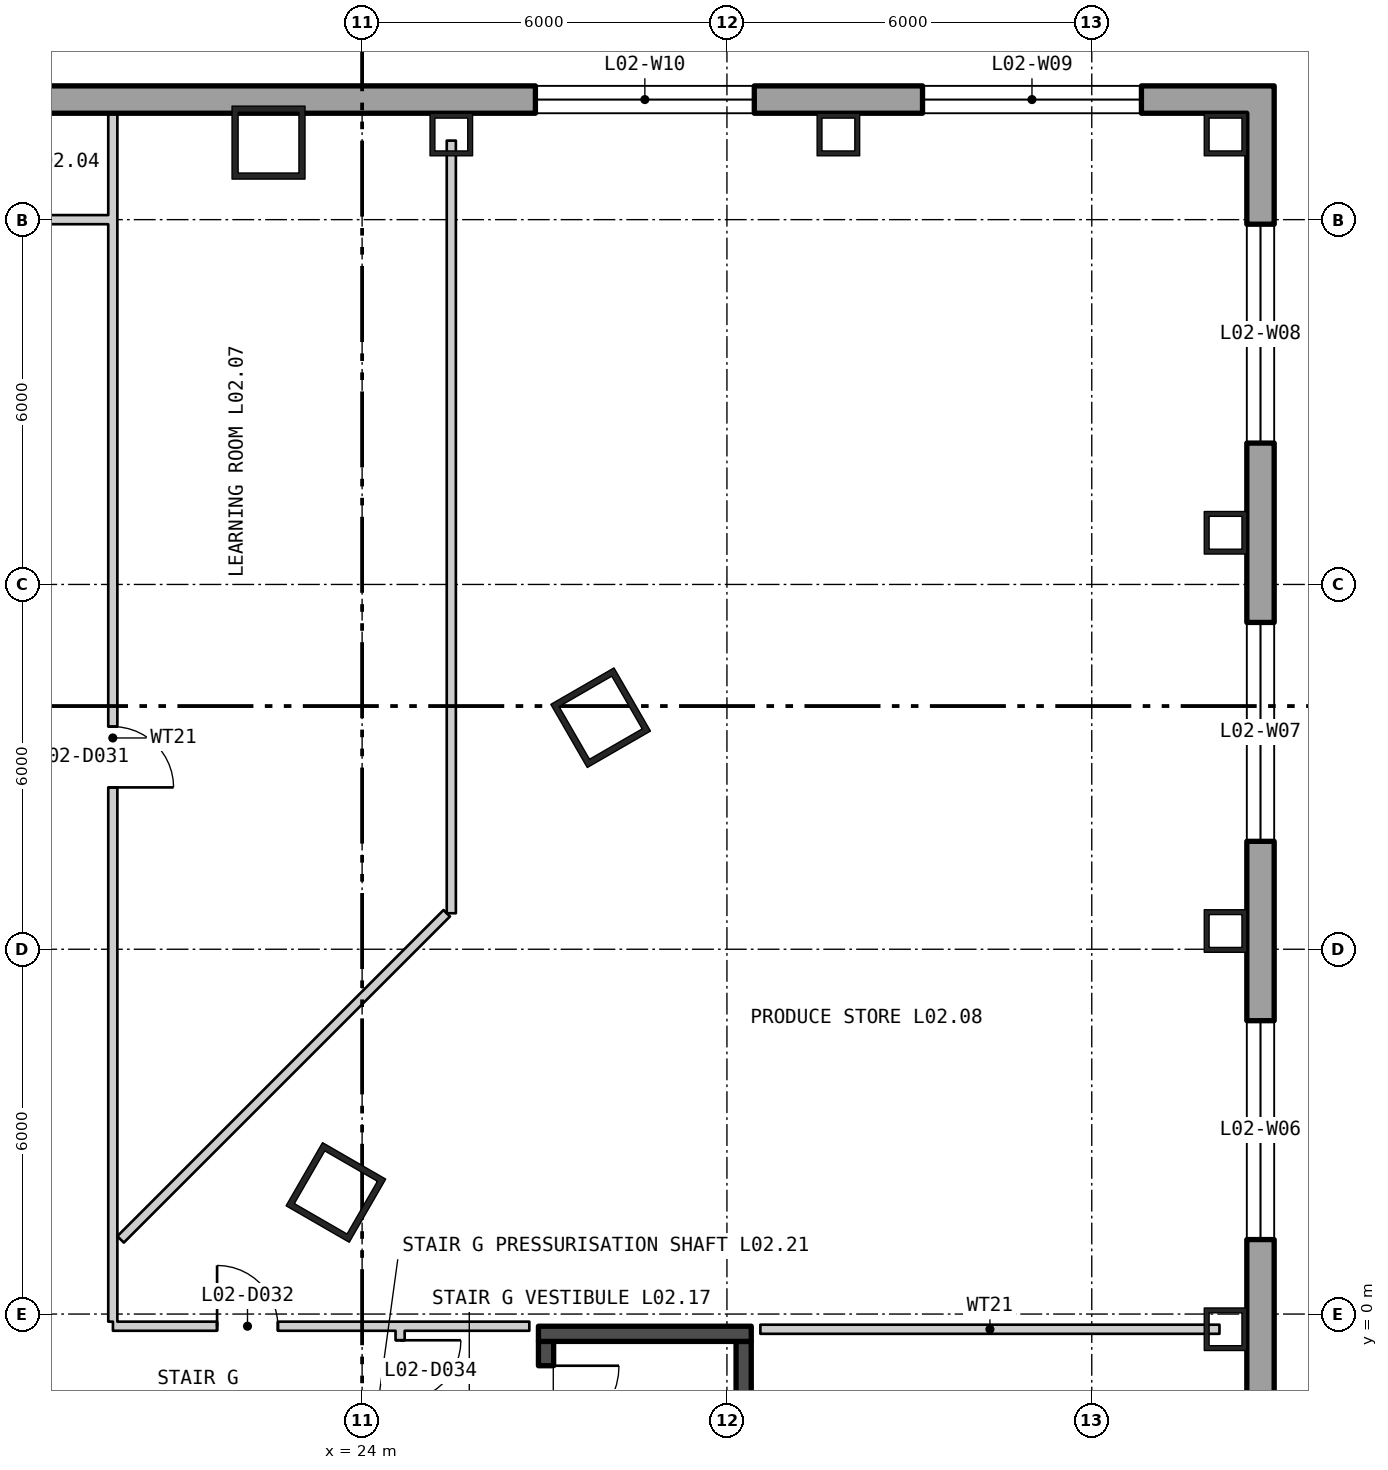
"""IFC4 building model, lengths in metres.
Left out: names, types, materials, properties, quantities, classifications, styles, units other than length and angle.
Written with IfcOpenShell. Run it as: python <this file> out.ifc"""

import sys

from ifc_helpers import new_model, si_unit, direction, frame, frame_2d, origin, origin_2d, place, context, subcontext, project, spatial, polyline, rectangle, hollow_rectangle, outline, extrude, element, fill, save


model = new_model("IFC4")
c1 = context("Model", 3, precision=1e-05, world=origin(), true_north=direction((0.0, 1.0)))
c2 = subcontext(c1, "Body", "Model", "MODEL_VIEW")
j1 = project(units=[si_unit("LENGTHUNIT", "METRE"), si_unit("PLANEANGLEUNIT", "RADIAN")], contexts=[c1])
p1 = place(None, origin())
s1 = spatial("IfcSite", under=j1, at=p1, CompositionType="ELEMENT")
p2 = place(p1, origin())
s2 = spatial("IfcBuilding", under=s1, at=p2, CompositionType="ELEMENT")
p3 = place(p2, frame((0.0, 0.0, 13.5)))
s3 = spatial("IfcBuildingStorey", under=s2, at=p3, CompositionType="ELEMENT", Elevation=13.5)
for number, where, z_axis, x_axis in (
    (1, (22.461, 19.267, 0.0), (0.0, 0.0, 1.0), (-1.0, 0.0, 0.0)),
    (2, (23.569, 2.0, 0.0), (0.0, 0.0, 1.0), (0.5, 0.866, 0.0)),
    (3, (27.923, 9.808, 0.0), (0.0, 0.0, 1.0), (-0.5, 0.866, 0.0)),
):
    element("IfcColumn", number, at=place(p3, frame(where, z_axis=z_axis, x_axis=x_axis)), inside=s3, PredefinedType="COLUMN", context=c2, shape_type="SweptSolid", body=[
        extrude(hollow_rectangle(XDim=1.2, YDim=1.2, WallThickness=0.1, at=origin_2d()), origin(), (0.0, 0.0, 1.0), 5.1),
    ])
for number, where, z_axis, x_axis in (
    (4, (38.2, -0.25, 0.0), (0.0, 0.0, 1.0), (0.0, 1.0, 0.0)),
    (5, (38.2, 6.3, 0.0), (0.0, 0.0, 1.0), (0.0, 1.0, 0.0)),
    (6, (38.2, 12.85, 0.0), (0.0, 0.0, 1.0), (0.0, 1.0, 0.0)),
    (7, (38.2, 19.4, 0.0), (0.0, 0.0, 1.0), (-1.0, 0.0, 0.0)),
    (8, (31.833, 19.4, 0.0), (0.0, 0.0, 1.0), (-1.0, 0.0, 0.0)),
    (9, (25.467, 19.4, 0.0), (0.0, 0.0, 1.0), (-1.0, 0.0, 0.0)),
):
    element("IfcColumn", number, at=place(p3, frame(where, z_axis=z_axis, x_axis=x_axis)), inside=s3, PredefinedType="COLUMN", context=c2, shape_type="SweptSolid", body=[
        extrude(hollow_rectangle(XDim=0.7, YDim=0.7, WallThickness=0.08, at=origin_2d()), origin(), (0.0, 0.0, 1.0), 5.1),
    ])
p4 = place(p3, frame((38.775, -33.575, -0.4), z_axis=(0.0, 0.0, 1.0), x_axis=(0.0, 1.0, 0.0)))
e10 = element("IfcWall", 10, at=p4, inside=s3, PredefinedType="SOLIDWALL", context=c2, shape_type="SweptSolid", body=[
    extrude(outline(polyline([(-0.225, -0.225), (53.775, -0.225), (53.325, 0.225), (0.225, 0.225), (-0.225, -0.225)])), origin(), (0.0, 0.0, 1.0), 5.1),
])
p5 = place(p4, frame((2.05, 0.0, 1.3)))
e11 = element("IfcOpeningElement", 11, at=p5, cuts=e10, PredefinedType="OPENING", context=c2, shape_type="SweptSolid", body=[
    extrude(rectangle(XDim=3.6, YDim=3.2, at=frame_2d((1.8, 1.6))), frame((0.0, 0.235, 0.0), z_axis=(0.0, -1.0, 0.0), x_axis=(1.0, 0.0, 0.0)), (0.0, 0.0, 1.0), 0.47),
])
p6 = place(p4, frame((8.6, 0.0, 1.3)))
e12 = element("IfcOpeningElement", 12, at=p6, cuts=e10, PredefinedType="OPENING", context=c2, shape_type="SweptSolid", body=[
    extrude(rectangle(XDim=3.6, YDim=3.2, at=frame_2d((1.8, 1.6))), frame((0.0, 0.235, 0.0), z_axis=(0.0, -1.0, 0.0), x_axis=(1.0, 0.0, 0.0)), (0.0, 0.0, 1.0), 0.47),
])
p7 = place(p4, frame((15.15, 0.0, 1.3)))
e13 = element("IfcOpeningElement", 13, at=p7, cuts=e10, PredefinedType="OPENING", context=c2, shape_type="SweptSolid", body=[
    extrude(rectangle(XDim=3.6, YDim=3.2, at=frame_2d((1.8, 1.6))), frame((0.0, 0.235, 0.0), z_axis=(0.0, -1.0, 0.0), x_axis=(1.0, 0.0, 0.0)), (0.0, 0.0, 1.0), 0.47),
])
p8 = place(p4, frame((21.7, 0.0, 1.3)))
e14 = element("IfcOpeningElement", 14, at=p8, cuts=e10, PredefinedType="OPENING", context=c2, shape_type="SweptSolid", body=[
    extrude(rectangle(XDim=3.6, YDim=3.2, at=frame_2d((1.8, 1.6))), frame((0.0, 0.235, 0.0), z_axis=(0.0, -1.0, 0.0), x_axis=(1.0, 0.0, 0.0)), (0.0, 0.0, 1.0), 0.47),
])
p9 = place(p4, frame((28.25, 0.0, 1.3)))
e15 = element("IfcOpeningElement", 15, at=p9, cuts=e10, PredefinedType="OPENING", context=c2, shape_type="SweptSolid", body=[
    extrude(rectangle(XDim=3.6, YDim=3.2, at=frame_2d((1.8, 1.6))), frame((0.0, 0.235, 0.0), z_axis=(0.0, -1.0, 0.0), x_axis=(1.0, 0.0, 0.0)), (0.0, 0.0, 1.0), 0.47),
])
p10 = place(p4, frame((34.8, 0.0, 1.3)))
e16 = element("IfcOpeningElement", 16, at=p10, cuts=e10, PredefinedType="OPENING", context=c2, shape_type="SweptSolid", body=[
    extrude(rectangle(XDim=3.6, YDim=3.2, at=frame_2d((1.8, 1.6))), frame((0.0, 0.235, 0.0), z_axis=(0.0, -1.0, 0.0), x_axis=(1.0, 0.0, 0.0)), (0.0, 0.0, 1.0), 0.47),
])
p11 = place(p4, frame((41.35, 0.0, 1.3)))
e17 = element("IfcOpeningElement", 17, at=p11, cuts=e10, PredefinedType="OPENING", context=c2, shape_type="SweptSolid", body=[
    extrude(rectangle(XDim=3.6, YDim=3.2, at=frame_2d((1.8, 1.6))), frame((0.0, 0.235, 0.0), z_axis=(0.0, -1.0, 0.0), x_axis=(1.0, 0.0, 0.0)), (0.0, 0.0, 1.0), 0.47),
])
p12 = place(p4, frame((47.9, 0.0, 1.3)))
e18 = element("IfcOpeningElement", 18, at=p12, cuts=e10, PredefinedType="OPENING", context=c2, shape_type="SweptSolid", body=[
    extrude(rectangle(XDim=3.6, YDim=3.2, at=frame_2d((1.8, 1.6))), frame((0.0, 0.235, 0.0), z_axis=(0.0, -1.0, 0.0), x_axis=(1.0, 0.0, 0.0)), (0.0, 0.0, 1.0), 0.47),
])
p13 = place(p3, frame((38.775, 19.975, -0.4), z_axis=(0.0, 0.0, 1.0), x_axis=(-1.0, 0.0, 0.0)))
e19 = element("IfcWall", 19, at=p13, inside=s3, PredefinedType="SOLIDWALL", context=c2, shape_type="SweptSolid", body=[
    extrude(outline(polyline([(-0.225, -0.225), (77.775, -0.225), (77.325, 0.225), (0.225, 0.225), (-0.225, -0.225)])), origin(), (0.0, 0.0, 1.0), 5.1),
])
p14 = place(p13, frame((1.958, 0.0, 1.3)))
e20 = element("IfcOpeningElement", 20, at=p14, cuts=e19, PredefinedType="OPENING", context=c2, shape_type="SweptSolid", body=[
    extrude(rectangle(XDim=3.6, YDim=3.2, at=frame_2d((1.8, 1.6))), frame((0.0, 0.235, 0.0), z_axis=(0.0, -1.0, 0.0), x_axis=(1.0, 0.0, 0.0)), (0.0, 0.0, 1.0), 0.47),
])
p15 = place(p13, frame((8.325, 0.0, 1.3)))
e21 = element("IfcOpeningElement", 21, at=p15, cuts=e19, PredefinedType="OPENING", context=c2, shape_type="SweptSolid", body=[
    extrude(rectangle(XDim=3.6, YDim=3.2, at=frame_2d((1.8, 1.6))), frame((0.0, 0.235, 0.0), z_axis=(0.0, -1.0, 0.0), x_axis=(1.0, 0.0, 0.0)), (0.0, 0.0, 1.0), 0.47),
])
p16 = place(p13, frame((20.952, 0.0, 1.3)))
e22 = element("IfcOpeningElement", 22, at=p16, cuts=e19, PredefinedType="OPENING", context=c2, shape_type="SweptSolid", body=[
    extrude(rectangle(XDim=3.6, YDim=3.2, at=frame_2d((1.8, 1.6))), frame((0.0, 0.235, 0.0), z_axis=(0.0, -1.0, 0.0), x_axis=(1.0, 0.0, 0.0)), (0.0, 0.0, 1.0), 0.47),
])
p17 = place(p13, frame((27.425, 0.0, 1.3)))
e23 = element("IfcOpeningElement", 23, at=p17, cuts=e19, PredefinedType="OPENING", context=c2, shape_type="SweptSolid", body=[
    extrude(rectangle(XDim=3.6, YDim=3.2, at=frame_2d((1.8, 1.6))), frame((0.0, 0.235, 0.0), z_axis=(0.0, -1.0, 0.0), x_axis=(1.0, 0.0, 0.0)), (0.0, 0.0, 1.0), 0.47),
])
p18 = place(p13, frame((46.525, 0.0, 1.3)))
e24 = element("IfcOpeningElement", 24, at=p18, cuts=e19, PredefinedType="OPENING", context=c2, shape_type="SweptSolid", body=[
    extrude(rectangle(XDim=3.6, YDim=3.2, at=frame_2d((1.8, 1.6))), frame((0.0, 0.235, 0.0), z_axis=(0.0, -1.0, 0.0), x_axis=(1.0, 0.0, 0.0)), (0.0, 0.0, 1.0), 0.47),
])
p19 = place(p13, frame((52.998, 0.0, 1.3)))
e25 = element("IfcOpeningElement", 25, at=p19, cuts=e19, PredefinedType="OPENING", context=c2, shape_type="SweptSolid", body=[
    extrude(rectangle(XDim=3.6, YDim=3.2, at=frame_2d((1.8, 1.6))), frame((0.0, 0.235, 0.0), z_axis=(0.0, -1.0, 0.0), x_axis=(1.0, 0.0, 0.0)), (0.0, 0.0, 1.0), 0.47),
])
p20 = place(p13, frame((65.625, 0.0, 1.3)))
e26 = element("IfcOpeningElement", 26, at=p20, cuts=e19, PredefinedType="OPENING", context=c2, shape_type="SweptSolid", body=[
    extrude(rectangle(XDim=3.6, YDim=3.2, at=frame_2d((1.8, 1.6))), frame((0.0, 0.235, 0.0), z_axis=(0.0, -1.0, 0.0), x_axis=(1.0, 0.0, 0.0)), (0.0, 0.0, 1.0), 0.47),
])
p21 = place(p13, frame((71.992, 0.0, 1.3)))
e27 = element("IfcOpeningElement", 27, at=p21, cuts=e19, PredefinedType="OPENING", context=c2, shape_type="SweptSolid", body=[
    extrude(rectangle(XDim=3.6, YDim=3.2, at=frame_2d((1.8, 1.6))), frame((0.0, 0.235, 0.0), z_axis=(0.0, -1.0, 0.0), x_axis=(1.0, 0.0, 0.0)), (0.0, 0.0, 1.0), 0.47),
])
p22 = place(p3, frame((27.025, -7.75, 0.0), z_axis=(0.0, 0.0, 1.0), x_axis=(0.0, 1.0, 0.0)))
e28 = element("IfcWall", 28, at=p22, inside=s3, PredefinedType="SHEAR", context=c2, shape_type="SweptSolid", body=[
    extrude(rectangle(XDim=7.3, YDim=0.25, at=frame_2d((3.65, 0.0))), origin(), (0.0, 0.0, 1.0), 4.88),
])
p23 = place(p22, frame((5.7, 0.0, 0.0)))
e29 = element("IfcOpeningElement", 29, at=p23, cuts=e28, PredefinedType="OPENING", context=c2, shape_type="SweptSolid", body=[
    extrude(rectangle(XDim=1.2, YDim=2.1, at=frame_2d((0.6, 1.05))), frame((0.0, 0.135, 0.0), z_axis=(0.0, -1.0, 0.0), x_axis=(1.0, 0.0, 0.0)), (0.0, 0.0, 1.0), 0.27),
])
p24 = place(p3, frame((30.275, -7.75, 0.0), z_axis=(0.0, 0.0, 1.0), x_axis=(0.0, 1.0, 0.0)))
e30 = element("IfcWall", 30, at=p24, inside=s3, PredefinedType="SHEAR", context=c2, shape_type="SweptSolid", body=[
    extrude(rectangle(XDim=7.3, YDim=0.25, at=frame_2d((3.65, 0.0))), origin(), (0.0, 0.0, 1.0), 4.88),
])
p25 = place(p3, frame((26.9, -0.325, 0.0), z_axis=(0.0, 0.0, 1.0), x_axis=(1.0, 0.0, 0.0)))
e31 = element("IfcWall", 31, at=p25, inside=s3, PredefinedType="SHEAR", context=c2, shape_type="SweptSolid", body=[
    extrude(rectangle(XDim=3.5, YDim=0.25, at=frame_2d((1.75, 0.0))), origin(), (0.0, 0.0, 1.0), 4.88),
])
p26 = place(p3, frame((17.5, 18.0, 0.0), z_axis=(0.0, 0.0, 1.0), x_axis=(1.0, 0.0, 0.0)))
e32 = element("IfcWall", 32, at=p26, inside=s3, PredefinedType="PARTITIONING", context=c2, shape_type="SweptSolid", body=[
    extrude(rectangle(XDim=2.475, YDim=0.15, at=frame_2d((1.238, 0.0))), origin(), (0.0, 0.0, 1.0), 4.33),
])
p27 = place(p3, frame((19.9, -0.125, 0.0), z_axis=(0.0, 0.0, 1.0), x_axis=(0.0, 1.0, 0.0)))
e33 = element("IfcWall", 33, at=p27, inside=s3, PredefinedType="PARTITIONING", context=c2, shape_type="SweptSolid", body=[
    extrude(rectangle(XDim=1.15, YDim=0.15, at=frame_2d((0.575, 0.0))), origin(), (0.0, 0.0, 1.0), 4.88),
])
p28 = place(p3, frame((19.9, 1.025, 0.0), z_axis=(0.0, 0.0, 1.0), x_axis=(0.0, 1.0, 0.0)))
e34 = element("IfcWall", 34, at=p28, inside=s3, PredefinedType="PARTITIONING", context=c2, shape_type="SweptSolid", body=[
    extrude(rectangle(XDim=16.9, YDim=0.15, at=frame_2d((8.45, 0.0))), origin(), (0.0, 0.0, 1.0), 4.88),
])
p29 = place(p28, frame((7.637, 0.0, 0.0)))
e35 = element("IfcOpeningElement", 35, at=p29, cuts=e34, PredefinedType="OPENING", context=c2, shape_type="SweptSolid", body=[
    extrude(rectangle(XDim=1.0, YDim=2.1, at=frame_2d((0.5, 1.05))), frame((0.0, 0.085, 0.0), z_axis=(0.0, -1.0, 0.0), x_axis=(1.0, 0.0, 0.0)), (0.0, 0.0, 1.0), 0.17),
])
p30 = place(p3, frame((19.9, 18.075, 0.0), z_axis=(0.0, 0.0, 1.0), x_axis=(0.0, 1.0, 0.0)))
e36 = element("IfcWall", 36, at=p30, inside=s3, PredefinedType="PARTITIONING", context=c2, shape_type="SweptSolid", body=[
    extrude(rectangle(XDim=1.675, YDim=0.15, at=frame_2d((0.838, 0.0))), origin(), (0.0, 0.0, 1.0), 4.88),
])
p31 = place(p3, frame((19.902, -0.2, 0.0), z_axis=(0.0, 0.0, 1.0), x_axis=(1.0, 0.0, 0.0)))
e37 = element("IfcWall", 37, at=p31, inside=s3, PredefinedType="PARTITIONING", context=c2, shape_type="SweptSolid", body=[
    extrude(rectangle(XDim=6.848, YDim=0.15, at=frame_2d((3.424, 0.0))), origin(), (0.0, 0.0, 1.0), 4.88),
])
p32 = place(p31, frame((1.713, 0.0, 0.0)))
e38 = element("IfcOpeningElement", 38, at=p32, cuts=e37, PredefinedType="OPENING", context=c2, shape_type="SweptSolid", body=[
    extrude(rectangle(XDim=1.0, YDim=2.1, at=frame_2d((0.5, 1.05))), frame((0.0, 0.085, 0.0), z_axis=(0.0, -1.0, 0.0), x_axis=(1.0, 0.0, 0.0)), (0.0, 0.0, 1.0), 0.17),
])
p33 = place(p3, frame((20.028, 1.228, 0.0), z_axis=(0.0, 0.0, 1.0), x_axis=(0.707106781187, 0.707106781187, 0.0)))
e39 = element("IfcWall", 39, at=p33, inside=s3, PredefinedType="PARTITIONING", context=c2, shape_type="SweptSolid", body=[
    extrude(rectangle(XDim=7.586, YDim=0.15, at=frame_2d((3.793, 0.0))), origin(), (0.0, 0.0, 1.0), 4.88),
])
p34 = place(p3, frame((24.625, -1.588, 0.0), z_axis=(0.0, 0.0, 1.0), x_axis=(0.0, 1.0, 0.0)))
e40 = element("IfcWall", 40, at=p34, inside=s3, PredefinedType="PARTITIONING", context=c2, shape_type="SweptSolid", body=[
    extrude(rectangle(XDim=1.313, YDim=0.15, at=frame_2d((0.656, 0.0))), origin(), (0.0, 0.0, 1.0), 4.88),
])
p35 = place(p34, frame((0.157, 0.0, 0.0)))
e41 = element("IfcOpeningElement", 41, at=p35, cuts=e40, PredefinedType="OPENING", context=c2, shape_type="SweptSolid", body=[
    extrude(rectangle(XDim=1.0, YDim=2.1, at=frame_2d((0.5, 1.05))), frame((0.0, 0.085, 0.0), z_axis=(0.0, -1.0, 0.0), x_axis=(1.0, 0.0, 0.0)), (0.0, 0.0, 1.0), 0.17),
])
p36 = place(p3, frame((25.467, 6.592, 0.0), z_axis=(0.0, 0.0, 1.0), x_axis=(0.0, 1.0, 0.0)))
e42 = element("IfcWall", 42, at=p36, inside=s3, PredefinedType="PARTITIONING", context=c2, shape_type="SweptSolid", body=[
    extrude(rectangle(XDim=7.736, YDim=0.15, at=frame_2d((3.868, 0.0))), origin(), (0.0, 0.0, 1.0), 4.88),
])
p37 = place(p3, frame((25.467, 14.328, 0.0), z_axis=(0.0, 0.0, 1.0), x_axis=(0.0, 1.0, 0.0)))
e43 = element("IfcWall", 43, at=p37, inside=s3, PredefinedType="PARTITIONING", context=c2, shape_type="SweptSolid", body=[
    extrude(rectangle(XDim=4.972, YDim=0.15, at=frame_2d((2.486, 0.0))), origin(), (0.0, 0.0, 1.0), 4.28),
])
p38 = place(p3, frame((30.55, -0.25, 0.0), z_axis=(0.0, 0.0, 1.0), x_axis=(1.0, 0.0, 0.0)))
e44 = element("IfcWall", 44, at=p38, inside=s3, PredefinedType="PARTITIONING", context=c2, shape_type="SweptSolid", body=[
    extrude(rectangle(XDim=7.55, YDim=0.15, at=frame_2d((3.775, 0.0))), origin(), (0.0, 0.0, 1.0), 4.88),
])
p39 = place(p10, origin())
e45 = element("IfcWindow", 45, at=p39, inside=s3, PartitioningType="SINGLE_PANEL", PredefinedType="WINDOW", context=c2, shape_type="SweptSolid", body=[
    extrude(rectangle(XDim=3.6, YDim=3.2, at=frame_2d((1.8, 1.6))), frame((0.0, 0.105, 0.0), z_axis=(0.0, -1.0, 0.0), x_axis=(1.0, 0.0, 0.0)), (0.0, 0.0, 1.0), 0.06),
])
fill(e16, e45)
p40 = place(p11, origin())
e46 = element("IfcWindow", 46, at=p40, inside=s3, PartitioningType="SINGLE_PANEL", PredefinedType="WINDOW", context=c2, shape_type="SweptSolid", body=[
    extrude(rectangle(XDim=3.6, YDim=3.2, at=frame_2d((1.8, 1.6))), frame((0.0, 0.105, 0.0), z_axis=(0.0, -1.0, 0.0), x_axis=(1.0, 0.0, 0.0)), (0.0, 0.0, 1.0), 0.06),
])
fill(e17, e46)
p41 = place(p12, origin())
e47 = element("IfcWindow", 47, at=p41, inside=s3, PartitioningType="SINGLE_PANEL", PredefinedType="WINDOW", context=c2, shape_type="SweptSolid", body=[
    extrude(rectangle(XDim=3.6, YDim=3.2, at=frame_2d((1.8, 1.6))), frame((0.0, 0.105, 0.0), z_axis=(0.0, -1.0, 0.0), x_axis=(1.0, 0.0, 0.0)), (0.0, 0.0, 1.0), 0.06),
])
fill(e18, e47)
p42 = place(p14, origin())
e48 = element("IfcWindow", 48, at=p42, inside=s3, PartitioningType="SINGLE_PANEL", PredefinedType="WINDOW", context=c2, shape_type="SweptSolid", body=[
    extrude(rectangle(XDim=3.6, YDim=3.2, at=frame_2d((1.8, 1.6))), frame((0.0, 0.105, 0.0), z_axis=(0.0, -1.0, 0.0), x_axis=(1.0, 0.0, 0.0)), (0.0, 0.0, 1.0), 0.06),
])
fill(e20, e48)
p43 = place(p15, origin())
e49 = element("IfcWindow", 49, at=p43, inside=s3, PartitioningType="SINGLE_PANEL", PredefinedType="WINDOW", context=c2, shape_type="SweptSolid", body=[
    extrude(rectangle(XDim=3.6, YDim=3.2, at=frame_2d((1.8, 1.6))), frame((0.0, 0.105, 0.0), z_axis=(0.0, -1.0, 0.0), x_axis=(1.0, 0.0, 0.0)), (0.0, 0.0, 1.0), 0.06),
])
fill(e21, e49)
p44 = place(p23, origin())
e50 = element("IfcDoor", 50, at=p44, inside=s3, OperationType="SINGLE_SWING_RIGHT", PredefinedType="DOOR", context=c2, shape_type="SweptSolid", body=[
    extrude(rectangle(XDim=1.2, YDim=2.1, at=frame_2d((0.6, 1.05))), frame((0.0, 0.025, 0.0), z_axis=(0.0, -1.0, 0.0), x_axis=(1.0, 0.0, 0.0)), (0.0, 0.0, 1.0), 0.05),
])
fill(e29, e50)
p45 = place(p29, origin())
e51 = element("IfcDoor", 51, at=p45, inside=s3, OperationType="SINGLE_SWING_LEFT", PredefinedType="DOOR", context=c2, shape_type="SweptSolid", body=[
    extrude(rectangle(XDim=1.0, YDim=2.1, at=frame_2d((0.5, 1.05))), frame((0.0, 0.025, 0.0), z_axis=(0.0, -1.0, 0.0), x_axis=(1.0, 0.0, 0.0)), (0.0, 0.0, 1.0), 0.05),
])
fill(e35, e51)
p46 = place(p32, origin())
e52 = element("IfcDoor", 52, at=p46, inside=s3, OperationType="SINGLE_SWING_RIGHT", PredefinedType="DOOR", context=c2, shape_type="SweptSolid", body=[
    extrude(rectangle(XDim=1.0, YDim=2.1, at=frame_2d((0.5, 1.05))), frame((0.0, 0.025, 0.0), z_axis=(0.0, -1.0, 0.0), x_axis=(1.0, 0.0, 0.0)), (0.0, 0.0, 1.0), 0.05),
])
fill(e38, e52)
p47 = place(p35, origin())
e53 = element("IfcDoor", 53, at=p47, inside=s3, OperationType="SINGLE_SWING_RIGHT", PredefinedType="DOOR", context=c2, shape_type="SweptSolid", body=[
    extrude(rectangle(XDim=1.0, YDim=2.1, at=frame_2d((0.5, 1.05))), frame((0.0, 0.025, 0.0), z_axis=(0.0, -1.0, 0.0), x_axis=(1.0, 0.0, 0.0)), (0.0, 0.0, 1.0), 0.05),
])
fill(e41, e53)
save(model, sys.argv[1])
